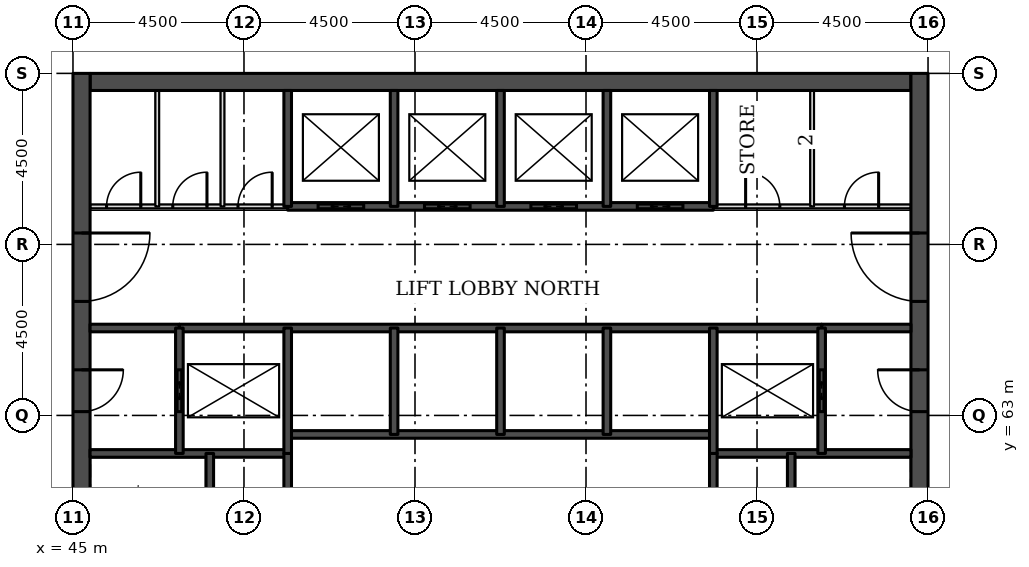
"""IFC4 building model, lengths in metres.
Left out: names, types, materials, properties, quantities, classifications, styles, units other than length and angle.
Written with IfcOpenShell. Run it as: python <this file> out.ifc"""

import sys

from ifc_helpers import new_model, si_unit, direction, frame, frame_2d, origin, place, context, subcontext, project, spatial, rectangle, extrude, element, fill, save


model = new_model("IFC4")
c1 = context("Model", 3, precision=1e-05, world=origin(), true_north=direction((0.0, 1.0)))
c2 = subcontext(c1, "Body", "Model", "MODEL_VIEW")
j1 = project(units=[si_unit("LENGTHUNIT", "METRE"), si_unit("PLANEANGLEUNIT", "RADIAN")], contexts=[c1])
p1 = place(None, origin())
s1 = spatial("IfcSite", under=j1, at=p1, CompositionType="ELEMENT")
p2 = place(p1, origin())
s2 = spatial("IfcBuilding", under=s1, at=p2, CompositionType="ELEMENT")
p3 = place(p2, frame((0.0, 0.0, 115.9)))
s3 = spatial("IfcBuildingStorey", under=s2, at=p3, CompositionType="ELEMENT", Elevation=115.9)
p4 = place(p3, frame((45.45, 71.775, 0.0), z_axis=(0.0, 0.0, 1.0), x_axis=(1.0, 0.0, 0.0)))
e1 = element("IfcWall", 1, at=p4, inside=s3, PredefinedType="SHEAR", context=c2, shape_type="SweptSolid", body=[
    extrude(rectangle(XDim=21.6, YDim=0.45, at=frame_2d((10.8, 0.0))), origin(), (0.0, 0.0, 1.0), 3.7),
])
p5 = place(p3, frame((45.225, 49.5, 0.0), z_axis=(0.0, 0.0, 1.0), x_axis=(0.0, 1.0, 0.0)))
e2 = element("IfcWall", 2, at=p5, inside=s3, PredefinedType="SHEAR", context=c2, shape_type="SweptSolid", body=[
    extrude(rectangle(XDim=22.5, YDim=0.45, at=frame_2d((11.25, 0.0))), origin(), (0.0, 0.0, 1.0), 3.7),
])
p6 = place(p5, frame((4.2, 0.0, 0.0)))
e3 = element("IfcOpeningElement", 3, at=p6, cuts=e2, PredefinedType="OPENING", context=c2, shape_type="SweptSolid", body=[
    extrude(rectangle(XDim=1.8, YDim=2.1, at=frame_2d((0.9, 1.05))), frame((0.0, 0.235, 0.0), z_axis=(0.0, -1.0, 0.0), x_axis=(1.0, 0.0, 0.0)), (0.0, 0.0, 1.0), 0.47),
])
p7 = place(p5, frame((6.9, 0.0, 0.0)))
e4 = element("IfcOpeningElement", 4, at=p7, cuts=e2, PredefinedType="OPENING", context=c2, shape_type="SweptSolid", body=[
    extrude(rectangle(XDim=1.1, YDim=2.1, at=frame_2d((0.55, 1.05))), frame((0.0, 0.235, 0.0), z_axis=(0.0, -1.0, 0.0), x_axis=(1.0, 0.0, 0.0)), (0.0, 0.0, 1.0), 0.47),
])
p8 = place(p5, frame((13.6, 0.0, 0.0)))
e5 = element("IfcOpeningElement", 5, at=p8, cuts=e2, PredefinedType="OPENING", context=c2, shape_type="SweptSolid", body=[
    extrude(rectangle(XDim=1.1, YDim=2.1, at=frame_2d((0.55, 1.05))), frame((0.0, 0.235, 0.0), z_axis=(0.0, -1.0, 0.0), x_axis=(1.0, 0.0, 0.0)), (0.0, 0.0, 1.0), 0.47),
])
p9 = place(p5, frame((16.5, 0.0, 0.0)))
e6 = element("IfcOpeningElement", 6, at=p9, cuts=e2, PredefinedType="OPENING", context=c2, shape_type="SweptSolid", body=[
    extrude(rectangle(XDim=1.8, YDim=2.1, at=frame_2d((0.9, 1.05))), frame((0.0, 0.235, 0.0), z_axis=(0.0, -1.0, 0.0), x_axis=(1.0, 0.0, 0.0)), (0.0, 0.0, 1.0), 0.47),
])
p10 = place(p3, frame((67.275, 49.5, 0.0), z_axis=(0.0, 0.0, 1.0), x_axis=(0.0, 1.0, 0.0)))
e7 = element("IfcWall", 7, at=p10, inside=s3, PredefinedType="SHEAR", context=c2, shape_type="SweptSolid", body=[
    extrude(rectangle(XDim=22.5, YDim=0.45, at=frame_2d((11.25, 0.0))), origin(), (0.0, 0.0, 1.0), 3.7),
])
p11 = place(p10, frame((4.2, 0.0, 0.0)))
e8 = element("IfcOpeningElement", 8, at=p11, cuts=e7, PredefinedType="OPENING", context=c2, shape_type="SweptSolid", body=[
    extrude(rectangle(XDim=1.8, YDim=2.1, at=frame_2d((0.9, 1.05))), frame((0.0, 0.235, 0.0), z_axis=(0.0, -1.0, 0.0), x_axis=(1.0, 0.0, 0.0)), (0.0, 0.0, 1.0), 0.47),
])
p12 = place(p10, frame((6.9, 0.0, 0.0)))
e9 = element("IfcOpeningElement", 9, at=p12, cuts=e7, PredefinedType="OPENING", context=c2, shape_type="SweptSolid", body=[
    extrude(rectangle(XDim=1.1, YDim=2.1, at=frame_2d((0.55, 1.05))), frame((0.0, 0.235, 0.0), z_axis=(0.0, -1.0, 0.0), x_axis=(1.0, 0.0, 0.0)), (0.0, 0.0, 1.0), 0.47),
])
p13 = place(p10, frame((13.6, 0.0, 0.0)))
e10 = element("IfcOpeningElement", 10, at=p13, cuts=e7, PredefinedType="OPENING", context=c2, shape_type="SweptSolid", body=[
    extrude(rectangle(XDim=1.1, YDim=2.1, at=frame_2d((0.55, 1.05))), frame((0.0, 0.235, 0.0), z_axis=(0.0, -1.0, 0.0), x_axis=(1.0, 0.0, 0.0)), (0.0, 0.0, 1.0), 0.47),
])
p14 = place(p10, frame((16.5, 0.0, 0.0)))
e11 = element("IfcOpeningElement", 11, at=p14, cuts=e7, PredefinedType="OPENING", context=c2, shape_type="SweptSolid", body=[
    extrude(rectangle(XDim=1.8, YDim=2.1, at=frame_2d((0.9, 1.05))), frame((0.0, 0.235, 0.0), z_axis=(0.0, -1.0, 0.0), x_axis=(1.0, 0.0, 0.0)), (0.0, 0.0, 1.0), 0.47),
])
for number, where, z_axis, x_axis in (
    (12, (45.45, 62.0, 0.0), (0.0, 0.0, 1.0), (1.0, 0.0, 0.0)),
    (13, (61.85, 62.0, 0.0), (0.0, 0.0, 1.0), (1.0, 0.0, 0.0)),
):
    element("IfcWall", number, at=place(p3, frame(where, z_axis=z_axis, x_axis=x_axis)), inside=s3, PredefinedType="SOLIDWALL", context=c2, shape_type="SweptSolid", body=[
        extrude(rectangle(XDim=5.2, YDim=0.2, at=frame_2d((2.6, 0.0))), origin(), (0.0, 0.0, 1.0), 3.55),
    ])
p15 = place(p3, frame((50.65, 62.5, 0.0), z_axis=(0.0, 0.0, 1.0), x_axis=(1.0, 0.0, 0.0)))
e14 = element("IfcWall", 14, at=p15, inside=s3, PredefinedType="SOLIDWALL", context=c2, shape_type="SweptSolid", body=[
    extrude(rectangle(XDim=11.2, YDim=0.2, at=frame_2d((5.6, 0.0))), origin(), (0.0, 0.0, 1.0), 3.7),
])
for number, where, z_axis, x_axis in (
    (15, (45.45, 65.3, 0.0), (0.0, 0.0, 1.0), (1.0, 0.0, 0.0)),
    (16, (64.7, 65.3, 0.0), (0.0, 0.0, 1.0), (1.0, 0.0, 0.0)),
):
    element("IfcWall", number, at=place(p3, frame(where, z_axis=z_axis, x_axis=x_axis)), inside=s3, PredefinedType="SOLIDWALL", context=c2, shape_type="SweptSolid", body=[
        extrude(rectangle(XDim=2.35, YDim=0.2, at=frame_2d((1.175, 0.0))), origin(), (0.0, 0.0, 1.0), 3.55),
    ])
p16 = place(p3, frame((47.8, 65.3, 0.0), z_axis=(0.0, 0.0, 1.0), x_axis=(1.0, 0.0, 0.0)))
e17 = element("IfcWall", 17, at=p16, inside=s3, PredefinedType="SOLIDWALL", context=c2, shape_type="SweptSolid", body=[
    extrude(rectangle(XDim=16.9, YDim=0.2, at=frame_2d((8.45, 0.0))), origin(), (0.0, 0.0, 1.0), 3.55),
])
p17 = place(p3, frame((45.45, 68.5, 0.0), z_axis=(0.0, 0.0, 1.0), x_axis=(1.0, 0.0, 0.0)))
e18 = element("IfcWall", 18, at=p17, inside=s3, PredefinedType="PARTITIONING", context=c2, shape_type="SweptSolid", body=[
    extrude(rectangle(XDim=5.2, YDim=0.1, at=frame_2d((2.6, 0.0))), origin(), (0.0, 0.0, 1.0), 3.55),
])
p18 = place(p17, frame((0.434, 0.0, 0.0)))
e19 = element("IfcOpeningElement", 19, at=p18, cuts=e18, PredefinedType="OPENING", context=c2, shape_type="SweptSolid", body=[
    extrude(rectangle(XDim=0.9, YDim=2.1, at=frame_2d((0.45, 1.05))), frame((0.0, 0.06, 0.0), z_axis=(0.0, -1.0, 0.0), x_axis=(1.0, 0.0, 0.0)), (0.0, 0.0, 1.0), 0.12),
])
p19 = place(p17, frame((2.176, 0.0, 0.0)))
e20 = element("IfcOpeningElement", 20, at=p19, cuts=e18, PredefinedType="OPENING", context=c2, shape_type="SweptSolid", body=[
    extrude(rectangle(XDim=0.9, YDim=2.1, at=frame_2d((0.45, 1.05))), frame((0.0, 0.06, 0.0), z_axis=(0.0, -1.0, 0.0), x_axis=(1.0, 0.0, 0.0)), (0.0, 0.0, 1.0), 0.12),
])
p20 = place(p17, frame((3.892, 0.0, 0.0)))
e21 = element("IfcOpeningElement", 21, at=p20, cuts=e18, PredefinedType="OPENING", context=c2, shape_type="SweptSolid", body=[
    extrude(rectangle(XDim=0.9, YDim=2.1, at=frame_2d((0.45, 1.05))), frame((0.0, 0.06, 0.0), z_axis=(0.0, -1.0, 0.0), x_axis=(1.0, 0.0, 0.0)), (0.0, 0.0, 1.0), 0.12),
])
p21 = place(p3, frame((61.85, 68.5, 0.0), z_axis=(0.0, 0.0, 1.0), x_axis=(1.0, 0.0, 0.0)))
e22 = element("IfcWall", 22, at=p21, inside=s3, PredefinedType="PARTITIONING", context=c2, shape_type="SweptSolid", body=[
    extrude(rectangle(XDim=5.2, YDim=0.1, at=frame_2d((2.6, 0.0))), origin(), (0.0, 0.0, 1.0), 3.55),
])
p22 = place(p21, frame((3.45, 0.0, 0.0)))
e23 = element("IfcOpeningElement", 23, at=p22, cuts=e22, PredefinedType="OPENING", context=c2, shape_type="SweptSolid", body=[
    extrude(rectangle(XDim=0.9, YDim=2.1, at=frame_2d((0.45, 1.05))), frame((0.0, 0.06, 0.0), z_axis=(0.0, -1.0, 0.0), x_axis=(1.0, 0.0, 0.0)), (0.0, 0.0, 1.0), 0.12),
])
p23 = place(p21, frame((0.85, 0.0, 0.0)))
e24 = element("IfcOpeningElement", 24, at=p23, cuts=e22, PredefinedType="OPENING", context=c2, shape_type="SweptSolid", body=[
    extrude(rectangle(XDim=0.9, YDim=2.1, at=frame_2d((0.45, 1.05))), frame((0.0, 0.06, 0.0), z_axis=(0.0, -1.0, 0.0), x_axis=(1.0, 0.0, 0.0)), (0.0, 0.0, 1.0), 0.12),
])
p24 = place(p3, frame((50.65, 68.5, 0.0), z_axis=(0.0, 0.0, 1.0), x_axis=(1.0, 0.0, 0.0)))
e25 = element("IfcWall", 25, at=p24, inside=s3, PredefinedType="SOLIDWALL", context=c2, shape_type="SweptSolid", body=[
    extrude(rectangle(XDim=11.2, YDim=0.2, at=frame_2d((5.6, 0.0))), origin(), (0.0, 0.0, 1.0), 3.55),
])
p25 = place(p24, frame((0.8, 0.0, 0.0)))
e26 = element("IfcOpeningElement", 26, at=p25, cuts=e25, PredefinedType="OPENING", context=c2, shape_type="SweptSolid", body=[
    extrude(rectangle(XDim=1.2, YDim=2.1, at=frame_2d((0.6, 1.05))), frame((0.0, 0.11, 0.0), z_axis=(0.0, -1.0, 0.0), x_axis=(1.0, 0.0, 0.0)), (0.0, 0.0, 1.0), 0.22),
])
p26 = place(p24, frame((3.6, 0.0, 0.0)))
e27 = element("IfcOpeningElement", 27, at=p26, cuts=e25, PredefinedType="OPENING", context=c2, shape_type="SweptSolid", body=[
    extrude(rectangle(XDim=1.2, YDim=2.1, at=frame_2d((0.6, 1.05))), frame((0.0, 0.11, 0.0), z_axis=(0.0, -1.0, 0.0), x_axis=(1.0, 0.0, 0.0)), (0.0, 0.0, 1.0), 0.22),
])
p27 = place(p24, frame((6.4, 0.0, 0.0)))
e28 = element("IfcOpeningElement", 28, at=p27, cuts=e25, PredefinedType="OPENING", context=c2, shape_type="SweptSolid", body=[
    extrude(rectangle(XDim=1.2, YDim=2.1, at=frame_2d((0.6, 1.05))), frame((0.0, 0.11, 0.0), z_axis=(0.0, -1.0, 0.0), x_axis=(1.0, 0.0, 0.0)), (0.0, 0.0, 1.0), 0.22),
])
p28 = place(p24, frame((9.2, 0.0, 0.0)))
e29 = element("IfcOpeningElement", 29, at=p28, cuts=e25, PredefinedType="OPENING", context=c2, shape_type="SweptSolid", body=[
    extrude(rectangle(XDim=1.2, YDim=2.1, at=frame_2d((0.6, 1.05))), frame((0.0, 0.11, 0.0), z_axis=(0.0, -1.0, 0.0), x_axis=(1.0, 0.0, 0.0)), (0.0, 0.0, 1.0), 0.22),
])
p29 = place(p3, frame((47.218, 68.5, 0.0), z_axis=(0.0, 0.0, 1.0), x_axis=(0.0, 1.0, 0.0)))
e30 = element("IfcWall", 30, at=p29, inside=s3, PredefinedType="PARTITIONING", context=c2, shape_type="SweptSolid", body=[
    extrude(rectangle(XDim=3.05, YDim=0.1, at=frame_2d((1.525, 0.0))), origin(), (0.0, 0.0, 1.0), 3.55),
])
p30 = place(p3, frame((47.8, 62.0, 0.0), z_axis=(0.0, 0.0, 1.0), x_axis=(0.0, 1.0, 0.0)))
e31 = element("IfcWall", 31, at=p30, inside=s3, PredefinedType="SOLIDWALL", context=c2, shape_type="SweptSolid", body=[
    extrude(rectangle(XDim=3.3, YDim=0.2, at=frame_2d((1.65, 0.0))), origin(), (0.0, 0.0, 1.0), 3.55),
])
p31 = place(p30, frame((1.1, 0.0, 0.0)))
e32 = element("IfcOpeningElement", 32, at=p31, cuts=e31, PredefinedType="OPENING", context=c2, shape_type="SweptSolid", body=[
    extrude(rectangle(XDim=1.1, YDim=2.1, at=frame_2d((0.55, 1.05))), frame((0.0, 0.11, 0.0), z_axis=(0.0, -1.0, 0.0), x_axis=(1.0, 0.0, 0.0)), (0.0, 0.0, 1.0), 0.22),
])
p32 = place(p3, frame((48.6, 56.2, 0.0), z_axis=(0.0, 0.0, 1.0), x_axis=(0.0, 1.0, 0.0)))
e33 = element("IfcWall", 33, at=p32, inside=s3, PredefinedType="SOLIDWALL", context=c2, shape_type="SweptSolid", body=[
    extrude(rectangle(XDim=5.8, YDim=0.2, at=frame_2d((2.9, 0.0))), origin(), (0.0, 0.0, 1.0), 3.55),
])
p33 = place(p3, frame((48.934, 68.5, 0.0), z_axis=(0.0, 0.0, 1.0), x_axis=(0.0, 1.0, 0.0)))
e34 = element("IfcWall", 34, at=p33, inside=s3, PredefinedType="PARTITIONING", context=c2, shape_type="SweptSolid", body=[
    extrude(rectangle(XDim=3.05, YDim=0.1, at=frame_2d((1.525, 0.0))), origin(), (0.0, 0.0, 1.0), 3.55),
])
p34 = place(p3, frame((50.65, 59.0, 0.0), z_axis=(0.0, 0.0, 1.0), x_axis=(0.0, 1.0, 0.0)))
e35 = element("IfcWall", 35, at=p34, inside=s3, PredefinedType="SOLIDWALL", context=c2, shape_type="SweptSolid", body=[
    extrude(rectangle(XDim=3.0, YDim=0.2, at=frame_2d((1.5, 0.0))), origin(), (0.0, 0.0, 1.0), 3.7),
])
p35 = place(p3, frame((50.65, 62.0, 0.0), z_axis=(0.0, 0.0, 1.0), x_axis=(0.0, 1.0, 0.0)))
e36 = element("IfcWall", 36, at=p35, inside=s3, PredefinedType="SOLIDWALL", context=c2, shape_type="SweptSolid", body=[
    extrude(rectangle(XDim=3.3, YDim=0.2, at=frame_2d((1.65, 0.0))), origin(), (0.0, 0.0, 1.0), 3.55),
])
p36 = place(p3, frame((50.65, 68.5, 0.0), z_axis=(0.0, 0.0, 1.0), x_axis=(0.0, 1.0, 0.0)))
e37 = element("IfcWall", 37, at=p36, inside=s3, PredefinedType="SOLIDWALL", context=c2, shape_type="SweptSolid", body=[
    extrude(rectangle(XDim=3.05, YDim=0.2, at=frame_2d((1.525, 0.0))), origin(), (0.0, 0.0, 1.0), 3.55),
])
p37 = place(p3, frame((53.45, 62.5, 0.0), z_axis=(0.0, 0.0, 1.0), x_axis=(0.0, 1.0, 0.0)))
e38 = element("IfcWall", 38, at=p37, inside=s3, PredefinedType="SOLIDWALL", context=c2, shape_type="SweptSolid", body=[
    extrude(rectangle(XDim=2.8, YDim=0.2, at=frame_2d((1.4, 0.0))), origin(), (0.0, 0.0, 1.0), 3.55),
])
p38 = place(p3, frame((53.45, 68.5, 0.0), z_axis=(0.0, 0.0, 1.0), x_axis=(0.0, 1.0, 0.0)))
e39 = element("IfcWall", 39, at=p38, inside=s3, PredefinedType="SOLIDWALL", context=c2, shape_type="SweptSolid", body=[
    extrude(rectangle(XDim=3.05, YDim=0.2, at=frame_2d((1.525, 0.0))), origin(), (0.0, 0.0, 1.0), 3.55),
])
p39 = place(p3, frame((56.25, 62.5, 0.0), z_axis=(0.0, 0.0, 1.0), x_axis=(0.0, 1.0, 0.0)))
e40 = element("IfcWall", 40, at=p39, inside=s3, PredefinedType="SOLIDWALL", context=c2, shape_type="SweptSolid", body=[
    extrude(rectangle(XDim=2.8, YDim=0.2, at=frame_2d((1.4, 0.0))), origin(), (0.0, 0.0, 1.0), 3.55),
])
p40 = place(p3, frame((56.25, 68.5, 0.0), z_axis=(0.0, 0.0, 1.0), x_axis=(0.0, 1.0, 0.0)))
e41 = element("IfcWall", 41, at=p40, inside=s3, PredefinedType="SOLIDWALL", context=c2, shape_type="SweptSolid", body=[
    extrude(rectangle(XDim=3.05, YDim=0.2, at=frame_2d((1.525, 0.0))), origin(), (0.0, 0.0, 1.0), 3.55),
])
p41 = place(p3, frame((59.05, 62.5, 0.0), z_axis=(0.0, 0.0, 1.0), x_axis=(0.0, 1.0, 0.0)))
e42 = element("IfcWall", 42, at=p41, inside=s3, PredefinedType="SOLIDWALL", context=c2, shape_type="SweptSolid", body=[
    extrude(rectangle(XDim=2.8, YDim=0.2, at=frame_2d((1.4, 0.0))), origin(), (0.0, 0.0, 1.0), 3.55),
])
p42 = place(p3, frame((59.05, 68.5, 0.0), z_axis=(0.0, 0.0, 1.0), x_axis=(0.0, 1.0, 0.0)))
e43 = element("IfcWall", 43, at=p42, inside=s3, PredefinedType="SOLIDWALL", context=c2, shape_type="SweptSolid", body=[
    extrude(rectangle(XDim=3.05, YDim=0.2, at=frame_2d((1.525, 0.0))), origin(), (0.0, 0.0, 1.0), 3.55),
])
p43 = place(p3, frame((61.85, 59.0, 0.0), z_axis=(0.0, 0.0, 1.0), x_axis=(0.0, 1.0, 0.0)))
e44 = element("IfcWall", 44, at=p43, inside=s3, PredefinedType="SOLIDWALL", context=c2, shape_type="SweptSolid", body=[
    extrude(rectangle(XDim=3.0, YDim=0.2, at=frame_2d((1.5, 0.0))), origin(), (0.0, 0.0, 1.0), 3.7),
])
p44 = place(p3, frame((61.85, 62.0, 0.0), z_axis=(0.0, 0.0, 1.0), x_axis=(0.0, 1.0, 0.0)))
e45 = element("IfcWall", 45, at=p44, inside=s3, PredefinedType="SOLIDWALL", context=c2, shape_type="SweptSolid", body=[
    extrude(rectangle(XDim=3.3, YDim=0.2, at=frame_2d((1.65, 0.0))), origin(), (0.0, 0.0, 1.0), 3.55),
])
p45 = place(p3, frame((61.85, 68.5, 0.0), z_axis=(0.0, 0.0, 1.0), x_axis=(0.0, 1.0, 0.0)))
e46 = element("IfcWall", 46, at=p45, inside=s3, PredefinedType="SOLIDWALL", context=c2, shape_type="SweptSolid", body=[
    extrude(rectangle(XDim=3.05, YDim=0.2, at=frame_2d((1.525, 0.0))), origin(), (0.0, 0.0, 1.0), 3.55),
])
p46 = place(p3, frame((63.9, 56.2, 0.0), z_axis=(0.0, 0.0, 1.0), x_axis=(0.0, 1.0, 0.0)))
e47 = element("IfcWall", 47, at=p46, inside=s3, PredefinedType="SOLIDWALL", context=c2, shape_type="SweptSolid", body=[
    extrude(rectangle(XDim=5.8, YDim=0.2, at=frame_2d((2.9, 0.0))), origin(), (0.0, 0.0, 1.0), 3.55),
])
p47 = place(p3, frame((64.45, 68.5, 0.0), z_axis=(0.0, 0.0, 1.0), x_axis=(0.0, 1.0, 0.0)))
e48 = element("IfcWall", 48, at=p47, inside=s3, PredefinedType="PARTITIONING", context=c2, shape_type="SweptSolid", body=[
    extrude(rectangle(XDim=3.05, YDim=0.1, at=frame_2d((1.525, 0.0))), origin(), (0.0, 0.0, 1.0), 3.55),
])
p48 = place(p3, frame((64.7, 62.0, 0.0), z_axis=(0.0, 0.0, 1.0), x_axis=(0.0, 1.0, 0.0)))
e49 = element("IfcWall", 49, at=p48, inside=s3, PredefinedType="SOLIDWALL", context=c2, shape_type="SweptSolid", body=[
    extrude(rectangle(XDim=3.3, YDim=0.2, at=frame_2d((1.65, 0.0))), origin(), (0.0, 0.0, 1.0), 3.55),
])
p49 = place(p48, frame((1.1, 0.0, 0.0)))
e50 = element("IfcOpeningElement", 50, at=p49, cuts=e49, PredefinedType="OPENING", context=c2, shape_type="SweptSolid", body=[
    extrude(rectangle(XDim=1.1, YDim=2.1, at=frame_2d((0.55, 1.05))), frame((0.0, 0.11, 0.0), z_axis=(0.0, -1.0, 0.0), x_axis=(1.0, 0.0, 0.0)), (0.0, 0.0, 1.0), 0.22),
])
p50 = place(p25, origin())
e51 = element("IfcDoor", 51, at=p50, inside=s3, OperationType="DOUBLE_DOOR_SLIDING", PredefinedType="DOOR", context=c2, shape_type="SweptSolid", body=[
    extrude(rectangle(XDim=1.2, YDim=2.1, at=frame_2d((0.6, 1.05))), frame((0.0, 0.025, 0.0), z_axis=(0.0, -1.0, 0.0), x_axis=(1.0, 0.0, 0.0)), (0.0, 0.0, 1.0), 0.05),
])
fill(e26, e51)
p51 = place(p26, origin())
e52 = element("IfcDoor", 52, at=p51, inside=s3, OperationType="DOUBLE_DOOR_SLIDING", PredefinedType="DOOR", context=c2, shape_type="SweptSolid", body=[
    extrude(rectangle(XDim=1.2, YDim=2.1, at=frame_2d((0.6, 1.05))), frame((0.0, 0.025, 0.0), z_axis=(0.0, -1.0, 0.0), x_axis=(1.0, 0.0, 0.0)), (0.0, 0.0, 1.0), 0.05),
])
fill(e27, e52)
p52 = place(p27, origin())
e53 = element("IfcDoor", 53, at=p52, inside=s3, OperationType="DOUBLE_DOOR_SLIDING", PredefinedType="DOOR", context=c2, shape_type="SweptSolid", body=[
    extrude(rectangle(XDim=1.2, YDim=2.1, at=frame_2d((0.6, 1.05))), frame((0.0, 0.025, 0.0), z_axis=(0.0, -1.0, 0.0), x_axis=(1.0, 0.0, 0.0)), (0.0, 0.0, 1.0), 0.05),
])
fill(e28, e53)
p53 = place(p28, origin())
e54 = element("IfcDoor", 54, at=p53, inside=s3, OperationType="DOUBLE_DOOR_SLIDING", PredefinedType="DOOR", context=c2, shape_type="SweptSolid", body=[
    extrude(rectangle(XDim=1.2, YDim=2.1, at=frame_2d((0.6, 1.05))), frame((0.0, 0.025, 0.0), z_axis=(0.0, -1.0, 0.0), x_axis=(1.0, 0.0, 0.0)), (0.0, 0.0, 1.0), 0.05),
])
fill(e29, e54)
p54 = place(p31, origin())
e55 = element("IfcDoor", 55, at=p54, inside=s3, OperationType="DOUBLE_DOOR_SLIDING", PredefinedType="DOOR", context=c2, shape_type="SweptSolid", body=[
    extrude(rectangle(XDim=1.1, YDim=2.1, at=frame_2d((0.55, 1.05))), frame((0.0, 0.025, 0.0), z_axis=(0.0, -1.0, 0.0), x_axis=(1.0, 0.0, 0.0)), (0.0, 0.0, 1.0), 0.05),
])
fill(e32, e55)
p55 = place(p49, origin())
e56 = element("IfcDoor", 56, at=p55, inside=s3, OperationType="DOUBLE_DOOR_SLIDING", PredefinedType="DOOR", context=c2, shape_type="SweptSolid", body=[
    extrude(rectangle(XDim=1.1, YDim=2.1, at=frame_2d((0.55, 1.05))), frame((0.0, 0.025, 0.0), z_axis=(0.0, -1.0, 0.0), x_axis=(1.0, 0.0, 0.0)), (0.0, 0.0, 1.0), 0.05),
])
fill(e50, e56)
p56 = place(p8, frame((1.1, 0.0, 0.0), z_axis=(0.0, 0.0, 1.0), x_axis=(-1.0, 0.0, 0.0)))
e57 = element("IfcDoor", 57, at=p56, inside=s3, OperationType="SINGLE_SWING_LEFT", PredefinedType="DOOR", context=c2, shape_type="SweptSolid", body=[
    extrude(rectangle(XDim=1.1, YDim=2.1, at=frame_2d((0.55, 1.05))), frame((0.0, 0.025, 0.0), z_axis=(0.0, -1.0, 0.0), x_axis=(1.0, 0.0, 0.0)), (0.0, 0.0, 1.0), 0.05),
])
fill(e5, e57)
p57 = place(p9, frame((1.8, 0.0, 0.0), z_axis=(0.0, 0.0, 1.0), x_axis=(-1.0, 0.0, 0.0)))
e58 = element("IfcDoor", 58, at=p57, inside=s3, OperationType="SINGLE_SWING_LEFT", PredefinedType="DOOR", context=c2, shape_type="SweptSolid", body=[
    extrude(rectangle(XDim=1.8, YDim=2.1, at=frame_2d((0.9, 1.05))), frame((0.0, 0.025, 0.0), z_axis=(0.0, -1.0, 0.0), x_axis=(1.0, 0.0, 0.0)), (0.0, 0.0, 1.0), 0.05),
])
fill(e6, e58)
p58 = place(p13, origin())
e59 = element("IfcDoor", 59, at=p58, inside=s3, OperationType="SINGLE_SWING_RIGHT", PredefinedType="DOOR", context=c2, shape_type="SweptSolid", body=[
    extrude(rectangle(XDim=1.1, YDim=2.1, at=frame_2d((0.55, 1.05))), frame((0.0, 0.025, 0.0), z_axis=(0.0, -1.0, 0.0), x_axis=(1.0, 0.0, 0.0)), (0.0, 0.0, 1.0), 0.05),
])
fill(e10, e59)
p59 = place(p14, origin())
e60 = element("IfcDoor", 60, at=p59, inside=s3, OperationType="SINGLE_SWING_RIGHT", PredefinedType="DOOR", context=c2, shape_type="SweptSolid", body=[
    extrude(rectangle(XDim=1.8, YDim=2.1, at=frame_2d((0.9, 1.05))), frame((0.0, 0.025, 0.0), z_axis=(0.0, -1.0, 0.0), x_axis=(1.0, 0.0, 0.0)), (0.0, 0.0, 1.0), 0.05),
])
fill(e11, e60)
p60 = place(p22, origin())
e61 = element("IfcDoor", 61, at=p60, inside=s3, OperationType="SINGLE_SWING_RIGHT", PredefinedType="DOOR", context=c2, shape_type="SweptSolid", body=[
    extrude(rectangle(XDim=0.9, YDim=2.1, at=frame_2d((0.45, 1.05))), frame((0.0, 0.025, 0.0), z_axis=(0.0, -1.0, 0.0), x_axis=(1.0, 0.0, 0.0)), (0.0, 0.0, 1.0), 0.05),
])
fill(e23, e61)
p61 = place(p23, origin())
e62 = element("IfcDoor", 62, at=p61, inside=s3, OperationType="SINGLE_SWING_LEFT", PredefinedType="DOOR", context=c2, shape_type="SweptSolid", body=[
    extrude(rectangle(XDim=0.9, YDim=2.1, at=frame_2d((0.45, 1.05))), frame((0.0, 0.025, 0.0), z_axis=(0.0, -1.0, 0.0), x_axis=(1.0, 0.0, 0.0)), (0.0, 0.0, 1.0), 0.05),
])
fill(e24, e62)
p62 = place(p18, origin())
e63 = element("IfcDoor", 63, at=p62, inside=s3, OperationType="SINGLE_SWING_RIGHT", PredefinedType="DOOR", context=c2, shape_type="SweptSolid", body=[
    extrude(rectangle(XDim=0.9, YDim=2.1, at=frame_2d((0.45, 1.05))), frame((0.0, 0.025, 0.0), z_axis=(0.0, -1.0, 0.0), x_axis=(1.0, 0.0, 0.0)), (0.0, 0.0, 1.0), 0.05),
])
fill(e19, e63)
p63 = place(p19, origin())
e64 = element("IfcDoor", 64, at=p63, inside=s3, OperationType="SINGLE_SWING_RIGHT", PredefinedType="DOOR", context=c2, shape_type="SweptSolid", body=[
    extrude(rectangle(XDim=0.9, YDim=2.1, at=frame_2d((0.45, 1.05))), frame((0.0, 0.025, 0.0), z_axis=(0.0, -1.0, 0.0), x_axis=(1.0, 0.0, 0.0)), (0.0, 0.0, 1.0), 0.05),
])
fill(e20, e64)
p64 = place(p20, origin())
e65 = element("IfcDoor", 65, at=p64, inside=s3, OperationType="SINGLE_SWING_RIGHT", PredefinedType="DOOR", context=c2, shape_type="SweptSolid", body=[
    extrude(rectangle(XDim=0.9, YDim=2.1, at=frame_2d((0.45, 1.05))), frame((0.0, 0.025, 0.0), z_axis=(0.0, -1.0, 0.0), x_axis=(1.0, 0.0, 0.0)), (0.0, 0.0, 1.0), 0.05),
])
fill(e21, e65)
save(model, sys.argv[1])
